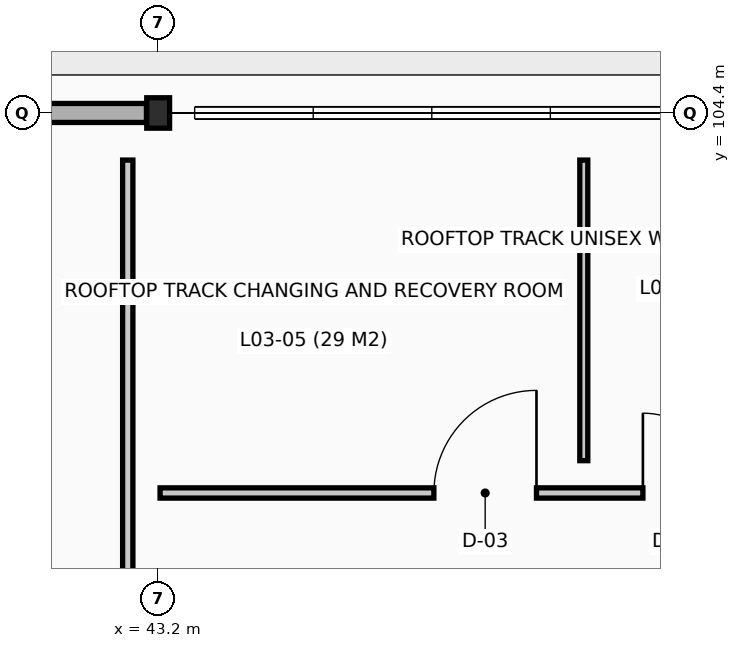
"""IFC4 building model, lengths in metres.
Left out: names, types, materials, properties, quantities, classifications, styles, units other than length and angle.
Written with IfcOpenShell. Run it as: python <this file> out.ifc"""

import sys

from ifc_helpers import new_model, si_unit, direction, frame, frame_2d, origin, origin_2d, place, context, subcontext, project, spatial, rectangle, i_section, extrude, element, fill, save


model = new_model("IFC4")
c1 = context("Model", 3, precision=1e-05, world=origin(), true_north=direction((0.0, 1.0)))
c2 = subcontext(c1, "Body", "Model", "MODEL_VIEW")
j1 = project(units=[si_unit("LENGTHUNIT", "METRE"), si_unit("PLANEANGLEUNIT", "RADIAN")], contexts=[c1])
p1 = place(None, origin())
s1 = spatial("IfcSite", under=j1, at=p1, CompositionType="ELEMENT")
p2 = place(p1, origin())
s2 = spatial("IfcBuilding", under=s1, at=p2, CompositionType="ELEMENT")
p3 = place(p2, frame((0.0, 0.0, 14.4)))
s3 = spatial("IfcBuildingStorey", under=s2, at=p3, CompositionType="ELEMENT", Elevation=14.4)
p4 = place(p3, frame((43.2, 104.4, 0.0), z_axis=(0.0, 0.0, 1.0), x_axis=(1.0, 0.0, 0.0)))
e1 = element("IfcColumn", 1, at=p4, inside=s3, PredefinedType="COLUMN", context=c2, shape_type="SweptSolid", body=[
    extrude(i_section(OverallWidth=0.3, OverallDepth=0.4, WebThickness=0.013, FlangeThickness=0.024, at=origin_2d()), origin(), (0.0, 0.0, 1.0), 4.8),
])
p5 = place(p3, frame((36.154, 104.4, 0.0), z_axis=(0.0, 0.0, 1.0), x_axis=(1.0, 0.0, 0.0)))
e2 = element("IfcWall", 2, at=p5, inside=s3, PredefinedType="SOLIDWALL", context=c2, shape_type="SweptSolid", body=[
    extrude(rectangle(XDim=6.892, YDim=0.25, at=frame_2d((3.446, 0.0))), origin(), (0.0, 0.0, 1.0), 3.15),
])
p6 = place(p5, frame((2.846, 0.0, 0.0)))
e3 = element("IfcOpeningElement", 3, at=p6, cuts=e2, PredefinedType="OPENING", context=c2, shape_type="SweptSolid", body=[
    extrude(rectangle(XDim=1.2, YDim=2.2, at=frame_2d((0.6, 1.1))), frame((0.0, 0.135, 0.0), z_axis=(0.0, -1.0, 0.0), x_axis=(1.0, 0.0, 0.0)), (0.0, 0.0, 1.0), 0.27),
])
p7 = place(p3, frame((42.8, 89.02, 0.0), z_axis=(0.0, 0.0, 1.0), x_axis=(0.0, 1.0, 0.0)))
e4 = element("IfcWall", 4, at=p7, inside=s3, PredefinedType="PARTITIONING", context=c2, shape_type="SweptSolid", body=[
    extrude(rectangle(XDim=14.76, YDim=0.135, at=frame_2d((7.38, 0.0))), origin(), (0.0, 0.0, 1.0), 3.985),
])
p8 = place(p3, frame((43.225, 99.4, 0.0), z_axis=(0.0, 0.0, 1.0), x_axis=(1.0, 0.0, 0.0)))
e5 = element("IfcWall", 5, at=p8, inside=s3, PredefinedType="PARTITIONING", context=c2, shape_type="SweptSolid", body=[
    extrude(rectangle(XDim=8.555, YDim=0.135, at=frame_2d((4.277, 0.0))), origin(), (0.0, 0.0, 1.0), 3.985),
])
p9 = place(p8, frame((3.603, 0.0, 0.0)))
e6 = element("IfcOpeningElement", 6, at=p9, cuts=e5, PredefinedType="OPENING", context=c2, shape_type="SweptSolid", body=[
    extrude(rectangle(XDim=1.35, YDim=2.15, at=frame_2d((0.675, 1.075))), frame((0.0, 0.077, 0.0), z_axis=(0.0, -1.0, 0.0), x_axis=(1.0, 0.0, 0.0)), (0.0, 0.0, 1.0), 0.155),
])
p10 = place(p8, frame((6.353, 0.0, 0.0)))
e7 = element("IfcOpeningElement", 7, at=p10, cuts=e5, PredefinedType="OPENING", context=c2, shape_type="SweptSolid", body=[
    extrude(rectangle(XDim=1.05, YDim=2.15, at=frame_2d((0.525, 1.075))), frame((0.0, 0.077, 0.0), z_axis=(0.0, -1.0, 0.0), x_axis=(1.0, 0.0, 0.0)), (0.0, 0.0, 1.0), 0.155),
])
p11 = place(p3, frame((48.8, 99.825, 0.0), z_axis=(0.0, 0.0, 1.0), x_axis=(0.0, 1.0, 0.0)))
e8 = element("IfcWall", 8, at=p11, inside=s3, PredefinedType="PARTITIONING", context=c2, shape_type="SweptSolid", body=[
    extrude(rectangle(XDim=3.955, YDim=0.105, at=frame_2d((1.978, 0.0))), origin(), (0.0, 0.0, 1.0), 3.985),
])
p12 = place(p9, origin())
e9 = element("IfcDoor", 9, at=p12, inside=s3, OperationType="SINGLE_SWING_RIGHT", PredefinedType="DOOR", context=c2, shape_type="SweptSolid", body=[
    extrude(rectangle(XDim=1.35, YDim=2.15, at=frame_2d((0.675, 1.075))), frame((0.0, 0.025, 0.0), z_axis=(0.0, -1.0, 0.0), x_axis=(1.0, 0.0, 0.0)), (0.0, 0.0, 1.0), 0.05),
])
fill(e6, e9)
p13 = place(p10, origin())
e10 = element("IfcDoor", 10, at=p13, inside=s3, OperationType="SINGLE_SWING_LEFT", PredefinedType="DOOR", context=c2, shape_type="SweptSolid", body=[
    extrude(rectangle(XDim=1.05, YDim=2.15, at=frame_2d((0.525, 1.075))), frame((0.0, 0.025, 0.0), z_axis=(0.0, -1.0, 0.0), x_axis=(1.0, 0.0, 0.0)), (0.0, 0.0, 1.0), 0.05),
])
fill(e7, e10)
save(model, sys.argv[1])
